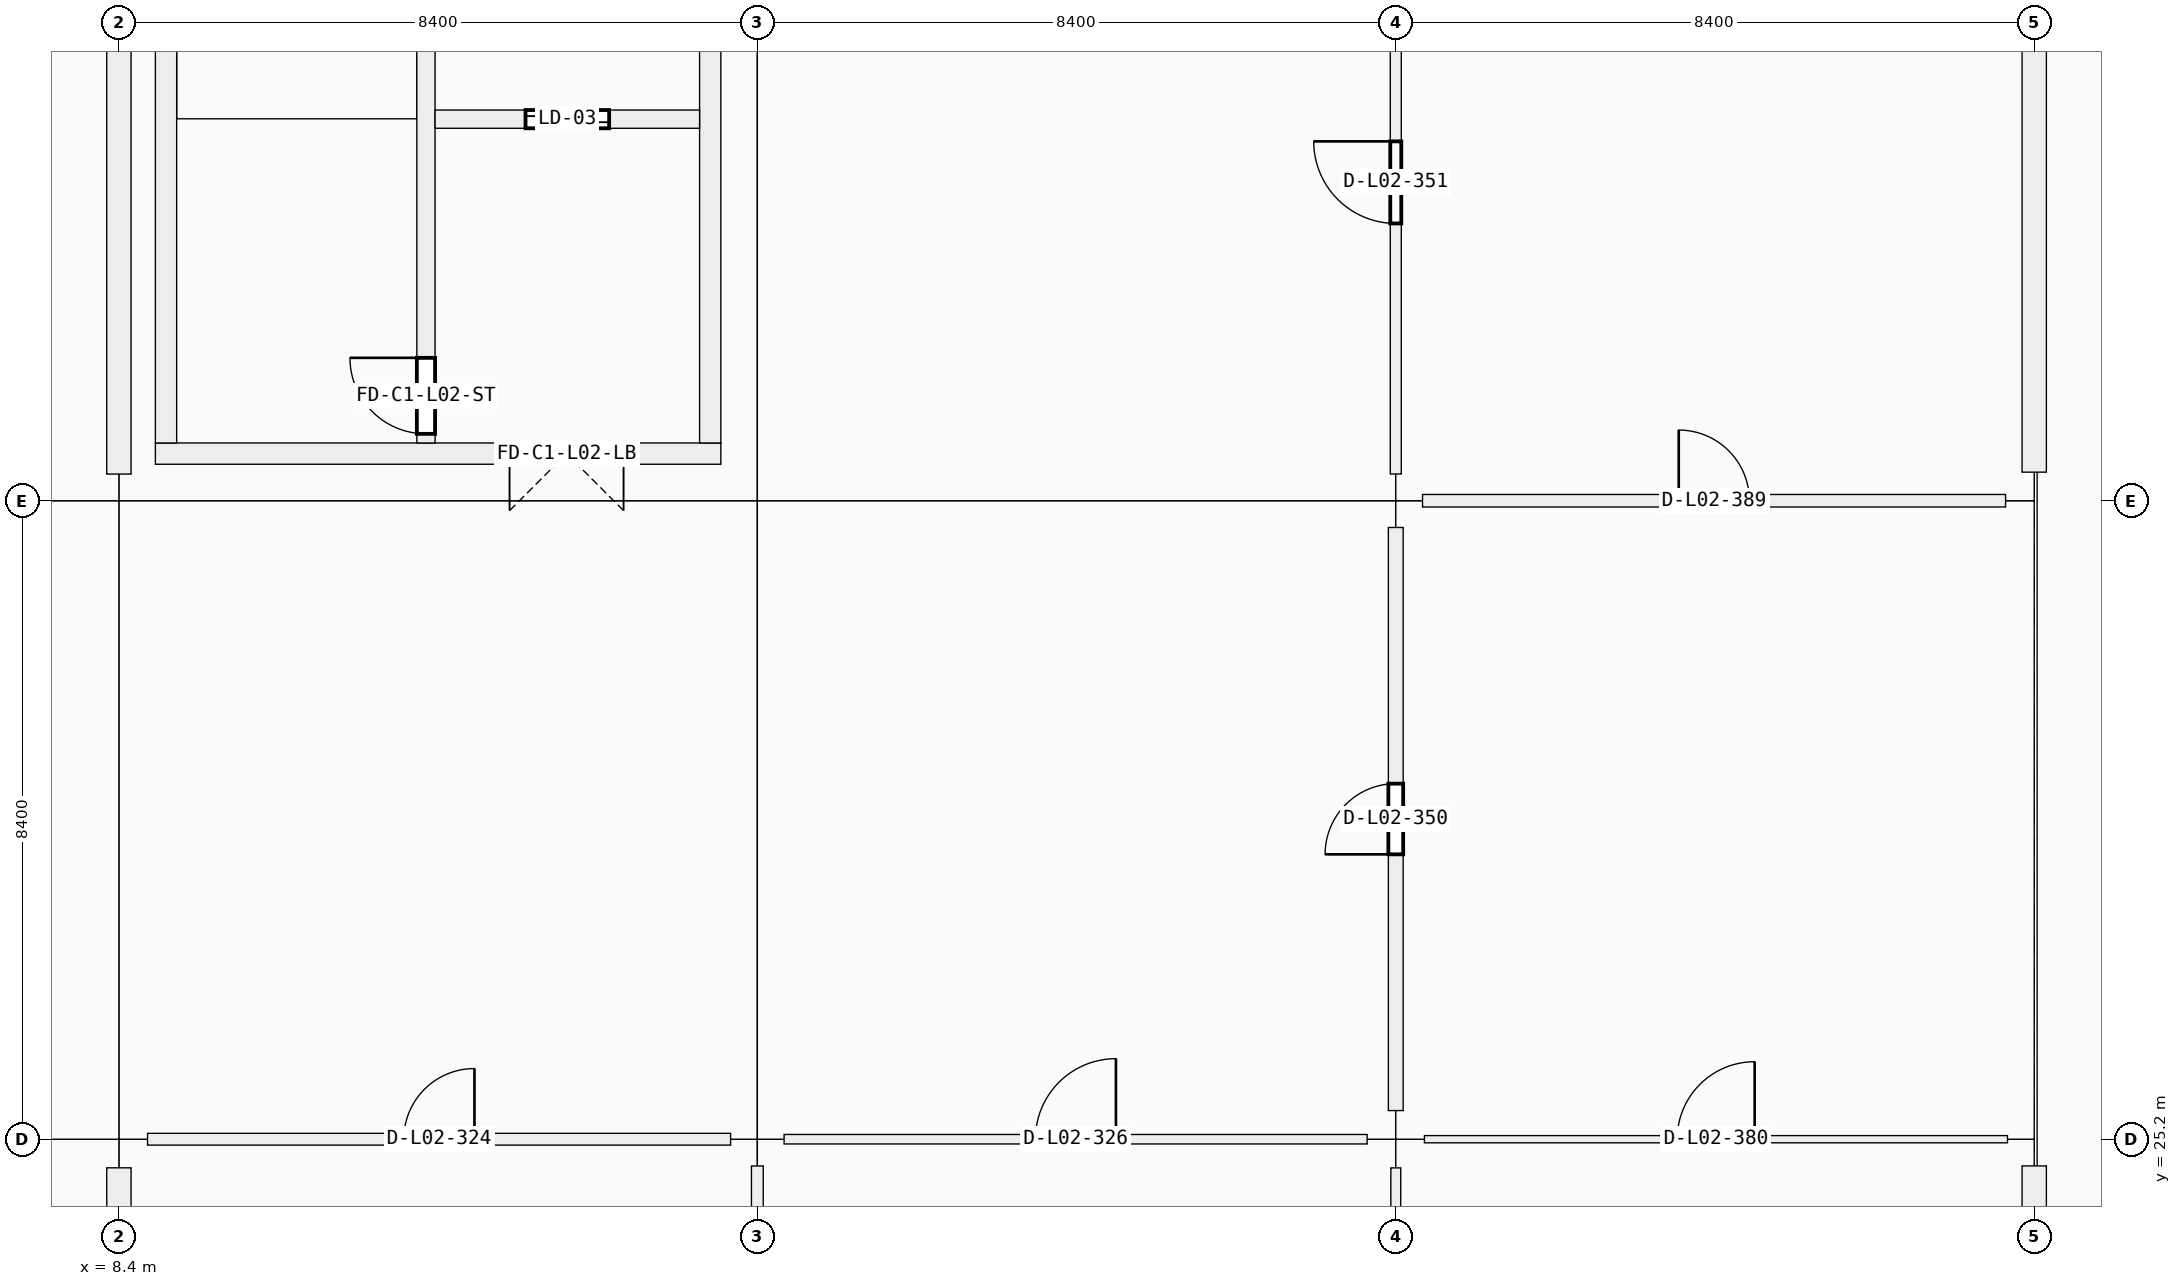
"""IFC4 building model, lengths in metres.
Left out: names, types, materials, properties, quantities, classifications, styles, units other than length and angle.
Written with IfcOpenShell. Run it as: python <this file> out.ifc"""

import sys

from ifc_helpers import new_model, si_unit, direction, frame, frame_2d, origin, origin_2d, place, context, subcontext, project, spatial, rectangle, extrude, element, fill, save


model = new_model("IFC4")
c1 = context("Model", 3, precision=1e-05, world=origin(), true_north=direction((0.0, 1.0)))
c2 = subcontext(c1, "Body", "Model", "MODEL_VIEW")
j1 = project(units=[si_unit("LENGTHUNIT", "METRE"), si_unit("PLANEANGLEUNIT", "RADIAN")], contexts=[c1])
p1 = place(None, origin())
s1 = spatial("IfcSite", under=j1, at=p1, CompositionType="ELEMENT")
p2 = place(p1, origin())
s2 = spatial("IfcBuilding", under=s1, at=p2, CompositionType="ELEMENT")
p3 = place(p2, frame((0.0, 0.0, 10.26)))
s3 = spatial("IfcBuildingStorey", under=s2, at=p3, CompositionType="ELEMENT", Elevation=10.26)
p4 = place(p3, frame((8.4, 25.2, 0.0), z_axis=(0.0, 0.0, 1.0), x_axis=(1.0, 0.0, 0.0)))
e1 = element("IfcColumn", 1, at=p4, inside=s3, PredefinedType="COLUMN", context=c2, shape_type="SweptSolid", body=[
    extrude(rectangle(XDim=0.75, YDim=0.75, at=origin_2d()), origin(), (0.0, 0.0, 1.0), 4.5),
])
for number, where, z_axis, x_axis in (
    (2, (8.4, 33.6, 0.0), (0.0, 0.0, 1.0), (1.0, 0.0, 0.0)),
    (3, (16.8, 25.2, 0.0), (0.0, 0.0, 1.0), (1.0, 0.0, 0.0)),
):
    element("IfcColumn", number, at=place(p3, frame(where, z_axis=z_axis, x_axis=x_axis)), inside=s3, PredefinedType="COLUMN", context=c2, shape_type="SweptSolid", body=[
        extrude(rectangle(XDim=0.7, YDim=0.7, at=origin_2d()), origin(), (0.0, 0.0, 1.0), 4.5),
    ])
for number, where, z_axis, x_axis in (
    (4, (16.8, 33.6, 0.0), (0.0, 0.0, 1.0), (1.0, 0.0, 0.0)),
    (5, (25.2, 25.2, 0.0), (0.0, 0.0, 1.0), (1.0, 0.0, 0.0)),
):
    element("IfcColumn", number, at=place(p3, frame(where, z_axis=z_axis, x_axis=x_axis)), inside=s3, PredefinedType="COLUMN", context=c2, shape_type="SweptSolid", body=[
        extrude(rectangle(XDim=0.75, YDim=0.75, at=origin_2d()), origin(), (0.0, 0.0, 1.0), 4.5),
    ])
for number, where, z_axis, x_axis in (
    (6, (25.2, 33.6, 0.0), (0.0, 0.0, 1.0), (1.0, 0.0, 0.0)),
    (7, (33.6, 25.2, 0.0), (0.0, 0.0, 1.0), (1.0, 0.0, 0.0)),
):
    element("IfcColumn", number, at=place(p3, frame(where, z_axis=z_axis, x_axis=x_axis)), inside=s3, PredefinedType="COLUMN", context=c2, shape_type="SweptSolid", body=[
        extrude(rectangle(XDim=0.7, YDim=0.7, at=origin_2d()), origin(), (0.0, 0.0, 1.0), 4.5),
    ])
p5 = place(p3, frame((33.6, 33.6, 0.0), z_axis=(0.0, 0.0, 1.0), x_axis=(1.0, 0.0, 0.0)))
e8 = element("IfcColumn", 8, at=p5, inside=s3, PredefinedType="COLUMN", context=c2, shape_type="SweptSolid", body=[
    extrude(rectangle(XDim=0.75, YDim=0.75, at=origin_2d()), origin(), (0.0, 0.0, 1.0), 4.5),
])
p6 = place(p3, frame((8.4, 17.151, 0.0), z_axis=(0.0, 0.0, 1.0), x_axis=(0.0, 1.0, 0.0)))
e9 = element("IfcWall", 9, at=p6, inside=s3, PredefinedType="SOLIDWALL", context=c2, shape_type="SweptSolid", body=[
    extrude(rectangle(XDim=7.673, YDim=0.32, at=frame_2d((3.836, 0.0))), origin(), (0.0, 0.0, 1.0), 3.54),
])
p7 = place(p6, frame((2.611, 0.0, 0.9)))
e10 = element("IfcOpeningElement", 10, at=p7, cuts=e9, PredefinedType="OPENING", context=c2, shape_type="SweptSolid", body=[
    extrude(rectangle(XDim=2.45, YDim=1.45, at=frame_2d((1.225, 0.725))), frame((0.0, 0.16, 0.0), z_axis=(0.0, -1.0, 0.0), x_axis=(1.0, 0.0, 0.0)), (0.0, 0.0, 1.0), 0.32),
])
p8 = place(p3, frame((8.4, 33.951, 0.0), z_axis=(0.0, 0.0, 1.0), x_axis=(0.0, 1.0, 0.0)))
e11 = element("IfcWall", 11, at=p8, inside=s3, PredefinedType="SOLIDWALL", context=c2, shape_type="SweptSolid", body=[
    extrude(rectangle(XDim=7.673, YDim=0.32, at=frame_2d((3.836, 0.0))), origin(), (0.0, 0.0, 1.0), 3.54),
])
p9 = place(p3, frame((33.6, 24.849, 0.0), z_axis=(0.0, 0.0, 1.0), x_axis=(0.0, -1.0, 0.0)))
e12 = element("IfcWall", 12, at=p9, inside=s3, PredefinedType="SOLIDWALL", context=c2, shape_type="SweptSolid", body=[
    extrude(rectangle(XDim=7.673, YDim=0.32, at=frame_2d((3.836, 0.0))), origin(), (0.0, 0.0, 1.0), 3.54),
])
p10 = place(p9, frame((2.837, 0.0, 0.9)))
e13 = element("IfcOpeningElement", 13, at=p10, cuts=e12, PredefinedType="OPENING", context=c2, shape_type="SweptSolid", body=[
    extrude(rectangle(XDim=2.0, YDim=2.1, at=frame_2d((1.0, 1.05))), frame((0.0, 0.16, 0.0), z_axis=(0.0, -1.0, 0.0), x_axis=(1.0, 0.0, 0.0)), (0.0, 0.0, 1.0), 0.32),
])
p11 = place(p3, frame((33.6, 41.649, 0.0), z_axis=(0.0, 0.0, 1.0), x_axis=(0.0, -1.0, 0.0)))
e14 = element("IfcWall", 14, at=p11, inside=s3, PredefinedType="SOLIDWALL", context=c2, shape_type="SweptSolid", body=[
    extrude(rectangle(XDim=7.673, YDim=0.32, at=frame_2d((3.836, 0.0))), origin(), (0.0, 0.0, 1.0), 3.54),
])
p12 = place(p11, frame((2.537, 0.0, 0.9)))
e15 = element("IfcOpeningElement", 15, at=p12, cuts=e14, PredefinedType="OPENING", context=c2, shape_type="SweptSolid", body=[
    extrude(rectangle(XDim=2.6, YDim=2.1, at=frame_2d((1.3, 1.05))), frame((0.0, 0.16, 0.0), z_axis=(0.0, -1.0, 0.0), x_axis=(1.0, 0.0, 0.0)), (0.0, 0.0, 1.0), 0.32),
])
p13 = place(p3, frame((16.32, 34.22, 0.0), z_axis=(0.0, 0.0, 1.0), x_axis=(-1.0, 0.0, 0.0)))
e16 = element("IfcWall", 16, at=p13, inside=s3, PredefinedType="SHEAR", context=c2, shape_type="SweptSolid", body=[
    extrude(rectangle(XDim=7.44, YDim=0.28, at=frame_2d((3.72, 0.0))), origin(), (0.0, 0.0, 1.0), 4.5),
])
p14 = place(p13, frame((1.28, 0.0, 0.0)))
e17 = element("IfcOpeningElement", 17, at=p14, cuts=e16, PredefinedType="OPENING", context=c2, shape_type="SweptSolid", body=[
    extrude(rectangle(XDim=1.5, YDim=2.15, at=frame_2d((0.75, 1.075))), frame((0.0, 0.14, 0.0), z_axis=(0.0, -1.0, 0.0), x_axis=(1.0, 0.0, 0.0)), (0.0, 0.0, 1.0), 0.28),
])
for number, where, z_axis, x_axis in (
    (18, (9.02, 34.36, 0.0), (0.0, 0.0, 1.0), (0.0, 1.0, 0.0)),
    (19, (16.18, 41.24, 0.0), (0.0, 0.0, 1.0), (0.0, -1.0, 0.0)),
):
    element("IfcWall", number, at=place(p3, frame(where, z_axis=z_axis, x_axis=x_axis)), inside=s3, PredefinedType="SHEAR", context=c2, shape_type="SweptSolid", body=[
        extrude(rectangle(XDim=6.88, YDim=0.28, at=frame_2d((3.44, 0.0))), origin(), (0.0, 0.0, 1.0), 4.5),
    ])
p15 = place(p3, frame((12.44, 34.36, 0.0), z_axis=(0.0, 0.0, 1.0), x_axis=(0.0, 1.0, 0.0)))
e20 = element("IfcWall", 20, at=p15, inside=s3, PredefinedType="SHEAR", context=c2, shape_type="SweptSolid", body=[
    extrude(rectangle(XDim=6.88, YDim=0.24, at=frame_2d((3.44, 0.0))), origin(), (0.0, 0.0, 1.0), 4.5),
])
p16 = place(p15, frame((0.12, 0.0, 0.0)))
e21 = element("IfcOpeningElement", 21, at=p16, cuts=e20, PredefinedType="OPENING", context=c2, shape_type="SweptSolid", body=[
    extrude(rectangle(XDim=1.0, YDim=2.15, at=frame_2d((0.5, 1.075))), frame((0.0, 0.12, 0.0), z_axis=(0.0, -1.0, 0.0), x_axis=(1.0, 0.0, 0.0)), (0.0, 0.0, 1.0), 0.24),
])
p17 = place(p3, frame((12.56, 38.62, 0.0), z_axis=(0.0, 0.0, 1.0), x_axis=(1.0, 0.0, 0.0)))
e22 = element("IfcWall", 22, at=p17, inside=s3, PredefinedType="SHEAR", context=c2, shape_type="SweptSolid", body=[
    extrude(rectangle(XDim=3.48, YDim=0.24, at=frame_2d((1.74, 0.0))), origin(), (0.0, 0.0, 1.0), 4.5),
])
p18 = place(p17, frame((1.19, 0.0, 0.0)))
e23 = element("IfcOpeningElement", 23, at=p18, cuts=e22, PredefinedType="OPENING", context=c2, shape_type="SweptSolid", body=[
    extrude(rectangle(XDim=1.1, YDim=2.15, at=frame_2d((0.55, 1.075))), frame((0.0, 0.12, 0.0), z_axis=(0.0, -1.0, 0.0), x_axis=(1.0, 0.0, 0.0)), (0.0, 0.0, 1.0), 0.24),
])
p19 = place(p3, frame((8.777, 25.2, 0.0), z_axis=(0.0, 0.0, 1.0), x_axis=(1.0, 0.0, 0.0)))
e24 = element("IfcWall", 24, at=p19, inside=s3, PredefinedType="PARTITIONING", context=c2, shape_type="SweptSolid", body=[
    extrude(rectangle(XDim=7.671, YDim=0.155, at=frame_2d((3.835, 0.0))), origin(), (0.0, 0.0, 1.0), 3.37),
])
p20 = place(p19, frame((3.371, 0.0, 0.0)))
e25 = element("IfcOpeningElement", 25, at=p20, cuts=e24, PredefinedType="OPENING", context=c2, shape_type="SweptSolid", body=[
    extrude(rectangle(XDim=0.93, YDim=2.12, at=frame_2d((0.465, 1.06))), frame((0.0, 0.078, 0.0), z_axis=(0.0, -1.0, 0.0), x_axis=(1.0, 0.0, 0.0)), (0.0, 0.0, 1.0), 0.155),
])
p21 = place(p3, frame((17.152, 25.2, 0.0), z_axis=(0.0, 0.0, 1.0), x_axis=(1.0, 0.0, 0.0)))
e26 = element("IfcWall", 26, at=p21, inside=s3, PredefinedType="PARTITIONING", context=c2, shape_type="SweptSolid", body=[
    extrude(rectangle(XDim=7.671, YDim=0.125, at=frame_2d((3.835, 0.0))), origin(), (0.0, 0.0, 1.0), 3.37),
])
p22 = place(p21, frame((3.306, 0.0, 0.0)))
e27 = element("IfcOpeningElement", 27, at=p22, cuts=e26, PredefinedType="OPENING", context=c2, shape_type="SweptSolid", body=[
    extrude(rectangle(XDim=1.06, YDim=2.25, at=frame_2d((0.53, 1.125))), frame((0.0, 0.062, 0.0), z_axis=(0.0, -1.0, 0.0), x_axis=(1.0, 0.0, 0.0)), (0.0, 0.0, 1.0), 0.125),
])
p23 = place(p3, frame((25.577, 25.2, 0.0), z_axis=(0.0, 0.0, 1.0), x_axis=(1.0, 0.0, 0.0)))
e28 = element("IfcWall", 28, at=p23, inside=s3, PredefinedType="PARTITIONING", context=c2, shape_type="SweptSolid", body=[
    extrude(rectangle(XDim=7.671, YDim=0.095, at=frame_2d((3.835, 0.0))), origin(), (0.0, 0.0, 1.0), 3.37),
])
p24 = place(p23, frame((3.325, 0.0, 0.0)))
e29 = element("IfcOpeningElement", 29, at=p24, cuts=e28, PredefinedType="OPENING", context=c2, shape_type="SweptSolid", body=[
    extrude(rectangle(XDim=1.02, YDim=2.2, at=frame_2d((0.51, 1.1))), frame((0.0, 0.047, 0.0), z_axis=(0.0, -1.0, 0.0), x_axis=(1.0, 0.0, 0.0)), (0.0, 0.0, 1.0), 0.095),
])
p25 = place(p3, frame((25.552, 33.6, 0.0), z_axis=(0.0, 0.0, 1.0), x_axis=(1.0, 0.0, 0.0)))
e30 = element("IfcWall", 30, at=p25, inside=s3, PredefinedType="PARTITIONING", context=c2, shape_type="SweptSolid", body=[
    extrude(rectangle(XDim=7.671, YDim=0.165, at=frame_2d((3.835, 0.0))), origin(), (0.0, 0.0, 1.0), 3.37),
])
p26 = place(p25, frame((3.371, 0.0, 0.0)))
e31 = element("IfcOpeningElement", 31, at=p26, cuts=e30, PredefinedType="OPENING", context=c2, shape_type="SweptSolid", body=[
    extrude(rectangle(XDim=0.93, YDim=2.12, at=frame_2d((0.465, 1.06))), frame((0.0, 0.083, 0.0), z_axis=(0.0, -1.0, 0.0), x_axis=(1.0, 0.0, 0.0)), (0.0, 0.0, 1.0), 0.165),
])
p27 = place(p3, frame((16.8, 17.177, 0.0), z_axis=(0.0, 0.0, 1.0), x_axis=(0.0, 1.0, 0.0)))
e32 = element("IfcWall", 32, at=p27, inside=s3, PredefinedType="PARTITIONING", context=c2, shape_type="SweptSolid", body=[
    extrude(rectangle(XDim=7.671, YDim=0.155, at=frame_2d((3.835, 0.0))), origin(), (0.0, 0.0, 1.0), 3.37),
])
p28 = place(p27, frame((3.325, 0.0, 0.0)))
e33 = element("IfcOpeningElement", 33, at=p28, cuts=e32, PredefinedType="OPENING", context=c2, shape_type="SweptSolid", body=[
    extrude(rectangle(XDim=1.02, YDim=2.2, at=frame_2d((0.51, 1.1))), frame((0.0, 0.078, 0.0), z_axis=(0.0, -1.0, 0.0), x_axis=(1.0, 0.0, 0.0)), (0.0, 0.0, 1.0), 0.155),
])
p29 = place(p3, frame((25.2, 17.152, 0.0), z_axis=(0.0, 0.0, 1.0), x_axis=(0.0, 1.0, 0.0)))
e34 = element("IfcWall", 34, at=p29, inside=s3, PredefinedType="MOVABLE", context=c2, shape_type="SweptSolid", body=[
    extrude(rectangle(XDim=7.671, YDim=0.13, at=frame_2d((3.835, 0.0))), origin(), (0.0, 0.0, 1.0), 3.37),
])
p30 = place(p29, frame((3.346, 0.0, 0.0)))
e35 = element("IfcOpeningElement", 35, at=p30, cuts=e34, PredefinedType="OPENING", context=c2, shape_type="SweptSolid", body=[
    extrude(rectangle(XDim=0.98, YDim=2.18, at=frame_2d((0.49, 1.09))), frame((0.0, 0.065, 0.0), z_axis=(0.0, -1.0, 0.0), x_axis=(1.0, 0.0, 0.0)), (0.0, 0.0, 1.0), 0.13),
])
p31 = place(p3, frame((25.2, 25.577, 0.0), z_axis=(0.0, 0.0, 1.0), x_axis=(0.0, 1.0, 0.0)))
e36 = element("IfcWall", 36, at=p31, inside=s3, PredefinedType="PARTITIONING", context=c2, shape_type="SweptSolid", body=[
    extrude(rectangle(XDim=7.671, YDim=0.195, at=frame_2d((3.835, 0.0))), origin(), (0.0, 0.0, 1.0), 3.37),
])
p32 = place(p31, frame((3.371, 0.0, 0.0)))
e37 = element("IfcOpeningElement", 37, at=p32, cuts=e36, PredefinedType="OPENING", context=c2, shape_type="SweptSolid", body=[
    extrude(rectangle(XDim=0.93, YDim=2.12, at=frame_2d((0.465, 1.06))), frame((0.0, 0.098, 0.0), z_axis=(0.0, -1.0, 0.0), x_axis=(1.0, 0.0, 0.0)), (0.0, 0.0, 1.0), 0.195),
])
p33 = place(p3, frame((25.2, 33.952, 0.0), z_axis=(0.0, 0.0, 1.0), x_axis=(0.0, 1.0, 0.0)))
e38 = element("IfcWall", 38, at=p33, inside=s3, PredefinedType="PARTITIONING", context=c2, shape_type="SweptSolid", body=[
    extrude(rectangle(XDim=7.671, YDim=0.145, at=frame_2d((3.835, 0.0))), origin(), (0.0, 0.0, 1.0), 3.37),
])
p34 = place(p33, frame((3.296, 0.0, 0.0)))
e39 = element("IfcOpeningElement", 39, at=p34, cuts=e38, PredefinedType="OPENING", context=c2, shape_type="SweptSolid", body=[
    extrude(rectangle(XDim=1.08, YDim=2.25, at=frame_2d((0.54, 1.125))), frame((0.0, 0.073, 0.0), z_axis=(0.0, -1.0, 0.0), x_axis=(1.0, 0.0, 0.0)), (0.0, 0.0, 1.0), 0.145),
])
p35 = place(p12, origin())
e40 = element("IfcWindow", 40, at=p35, inside=s3, PartitioningType="SINGLE_PANEL", PredefinedType="WINDOW", context=c2, shape_type="SweptSolid", body=[
    extrude(rectangle(XDim=2.6, YDim=2.1, at=frame_2d((1.3, 1.05))), frame((0.0, 0.03, 0.0), z_axis=(0.0, -1.0, 0.0), x_axis=(1.0, 0.0, 0.0)), (0.0, 0.0, 1.0), 0.06),
])
fill(e15, e40)
p36 = place(p16, origin())
e41 = element("IfcDoor", 41, at=p36, inside=s3, OperationType="SINGLE_SWING_RIGHT", PredefinedType="DOOR", context=c2, shape_type="SweptSolid", body=[
    extrude(rectangle(XDim=1.0, YDim=2.15, at=frame_2d((0.5, 1.075))), frame((0.0, 0.025, 0.0), z_axis=(0.0, -1.0, 0.0), x_axis=(1.0, 0.0, 0.0)), (0.0, 0.0, 1.0), 0.05),
])
fill(e21, e41)
p37 = place(p14, origin())
e42 = element("IfcDoor", 42, at=p37, inside=s3, OperationType="DOUBLE_DOOR_SINGLE_SWING", PredefinedType="DOOR", context=c2, shape_type="SweptSolid", body=[
    extrude(rectangle(XDim=1.5, YDim=2.15, at=frame_2d((0.75, 1.075))), frame((0.0, 0.025, 0.0), z_axis=(0.0, -1.0, 0.0), x_axis=(1.0, 0.0, 0.0)), (0.0, 0.0, 1.0), 0.05),
])
fill(e17, e42)
p38 = place(p18, origin())
e43 = element("IfcDoor", 43, at=p38, inside=s3, OperationType="DOUBLE_DOOR_SLIDING", PredefinedType="DOOR", context=c2, shape_type="SweptSolid", body=[
    extrude(rectangle(XDim=1.1, YDim=2.15, at=frame_2d((0.55, 1.075))), frame((0.0, 0.025, 0.0), z_axis=(0.0, -1.0, 0.0), x_axis=(1.0, 0.0, 0.0)), (0.0, 0.0, 1.0), 0.05),
])
fill(e23, e43)
p39 = place(p20, origin())
e44 = element("IfcDoor", 44, at=p39, inside=s3, OperationType="SINGLE_SWING_RIGHT", PredefinedType="DOOR", context=c2, shape_type="SweptSolid", body=[
    extrude(rectangle(XDim=0.93, YDim=2.12, at=frame_2d((0.465, 1.06))), frame((0.0, 0.025, 0.0), z_axis=(0.0, -1.0, 0.0), x_axis=(1.0, 0.0, 0.0)), (0.0, 0.0, 1.0), 0.05),
])
fill(e25, e44)
p40 = place(p22, origin())
e45 = element("IfcDoor", 45, at=p40, inside=s3, OperationType="SINGLE_SWING_RIGHT", PredefinedType="DOOR", context=c2, shape_type="SweptSolid", body=[
    extrude(rectangle(XDim=1.06, YDim=2.25, at=frame_2d((0.53, 1.125))), frame((0.0, 0.025, 0.0), z_axis=(0.0, -1.0, 0.0), x_axis=(1.0, 0.0, 0.0)), (0.0, 0.0, 1.0), 0.05),
])
fill(e27, e45)
p41 = place(p32, origin())
e46 = element("IfcDoor", 46, at=p41, inside=s3, OperationType="SINGLE_SWING_LEFT", PredefinedType="DOOR", context=c2, shape_type="SweptSolid", body=[
    extrude(rectangle(XDim=0.93, YDim=2.12, at=frame_2d((0.465, 1.06))), frame((0.0, 0.025, 0.0), z_axis=(0.0, -1.0, 0.0), x_axis=(1.0, 0.0, 0.0)), (0.0, 0.0, 1.0), 0.05),
])
fill(e37, e46)
p42 = place(p34, origin())
e47 = element("IfcDoor", 47, at=p42, inside=s3, OperationType="SINGLE_SWING_RIGHT", PredefinedType="DOOR", context=c2, shape_type="SweptSolid", body=[
    extrude(rectangle(XDim=1.08, YDim=2.25, at=frame_2d((0.54, 1.125))), frame((0.0, 0.025, 0.0), z_axis=(0.0, -1.0, 0.0), x_axis=(1.0, 0.0, 0.0)), (0.0, 0.0, 1.0), 0.05),
])
fill(e39, e47)
p43 = place(p24, origin())
e48 = element("IfcDoor", 48, at=p43, inside=s3, OperationType="SINGLE_SWING_RIGHT", PredefinedType="DOOR", context=c2, shape_type="SweptSolid", body=[
    extrude(rectangle(XDim=1.02, YDim=2.2, at=frame_2d((0.51, 1.1))), frame((0.0, 0.025, 0.0), z_axis=(0.0, -1.0, 0.0), x_axis=(1.0, 0.0, 0.0)), (0.0, 0.0, 1.0), 0.05),
])
fill(e29, e48)
p44 = place(p26, origin())
e49 = element("IfcDoor", 49, at=p44, inside=s3, OperationType="SINGLE_SWING_LEFT", PredefinedType="DOOR", context=c2, shape_type="SweptSolid", body=[
    extrude(rectangle(XDim=0.93, YDim=2.12, at=frame_2d((0.465, 1.06))), frame((0.0, 0.025, 0.0), z_axis=(0.0, -1.0, 0.0), x_axis=(1.0, 0.0, 0.0)), (0.0, 0.0, 1.0), 0.05),
])
fill(e31, e49)
save(model, sys.argv[1])
